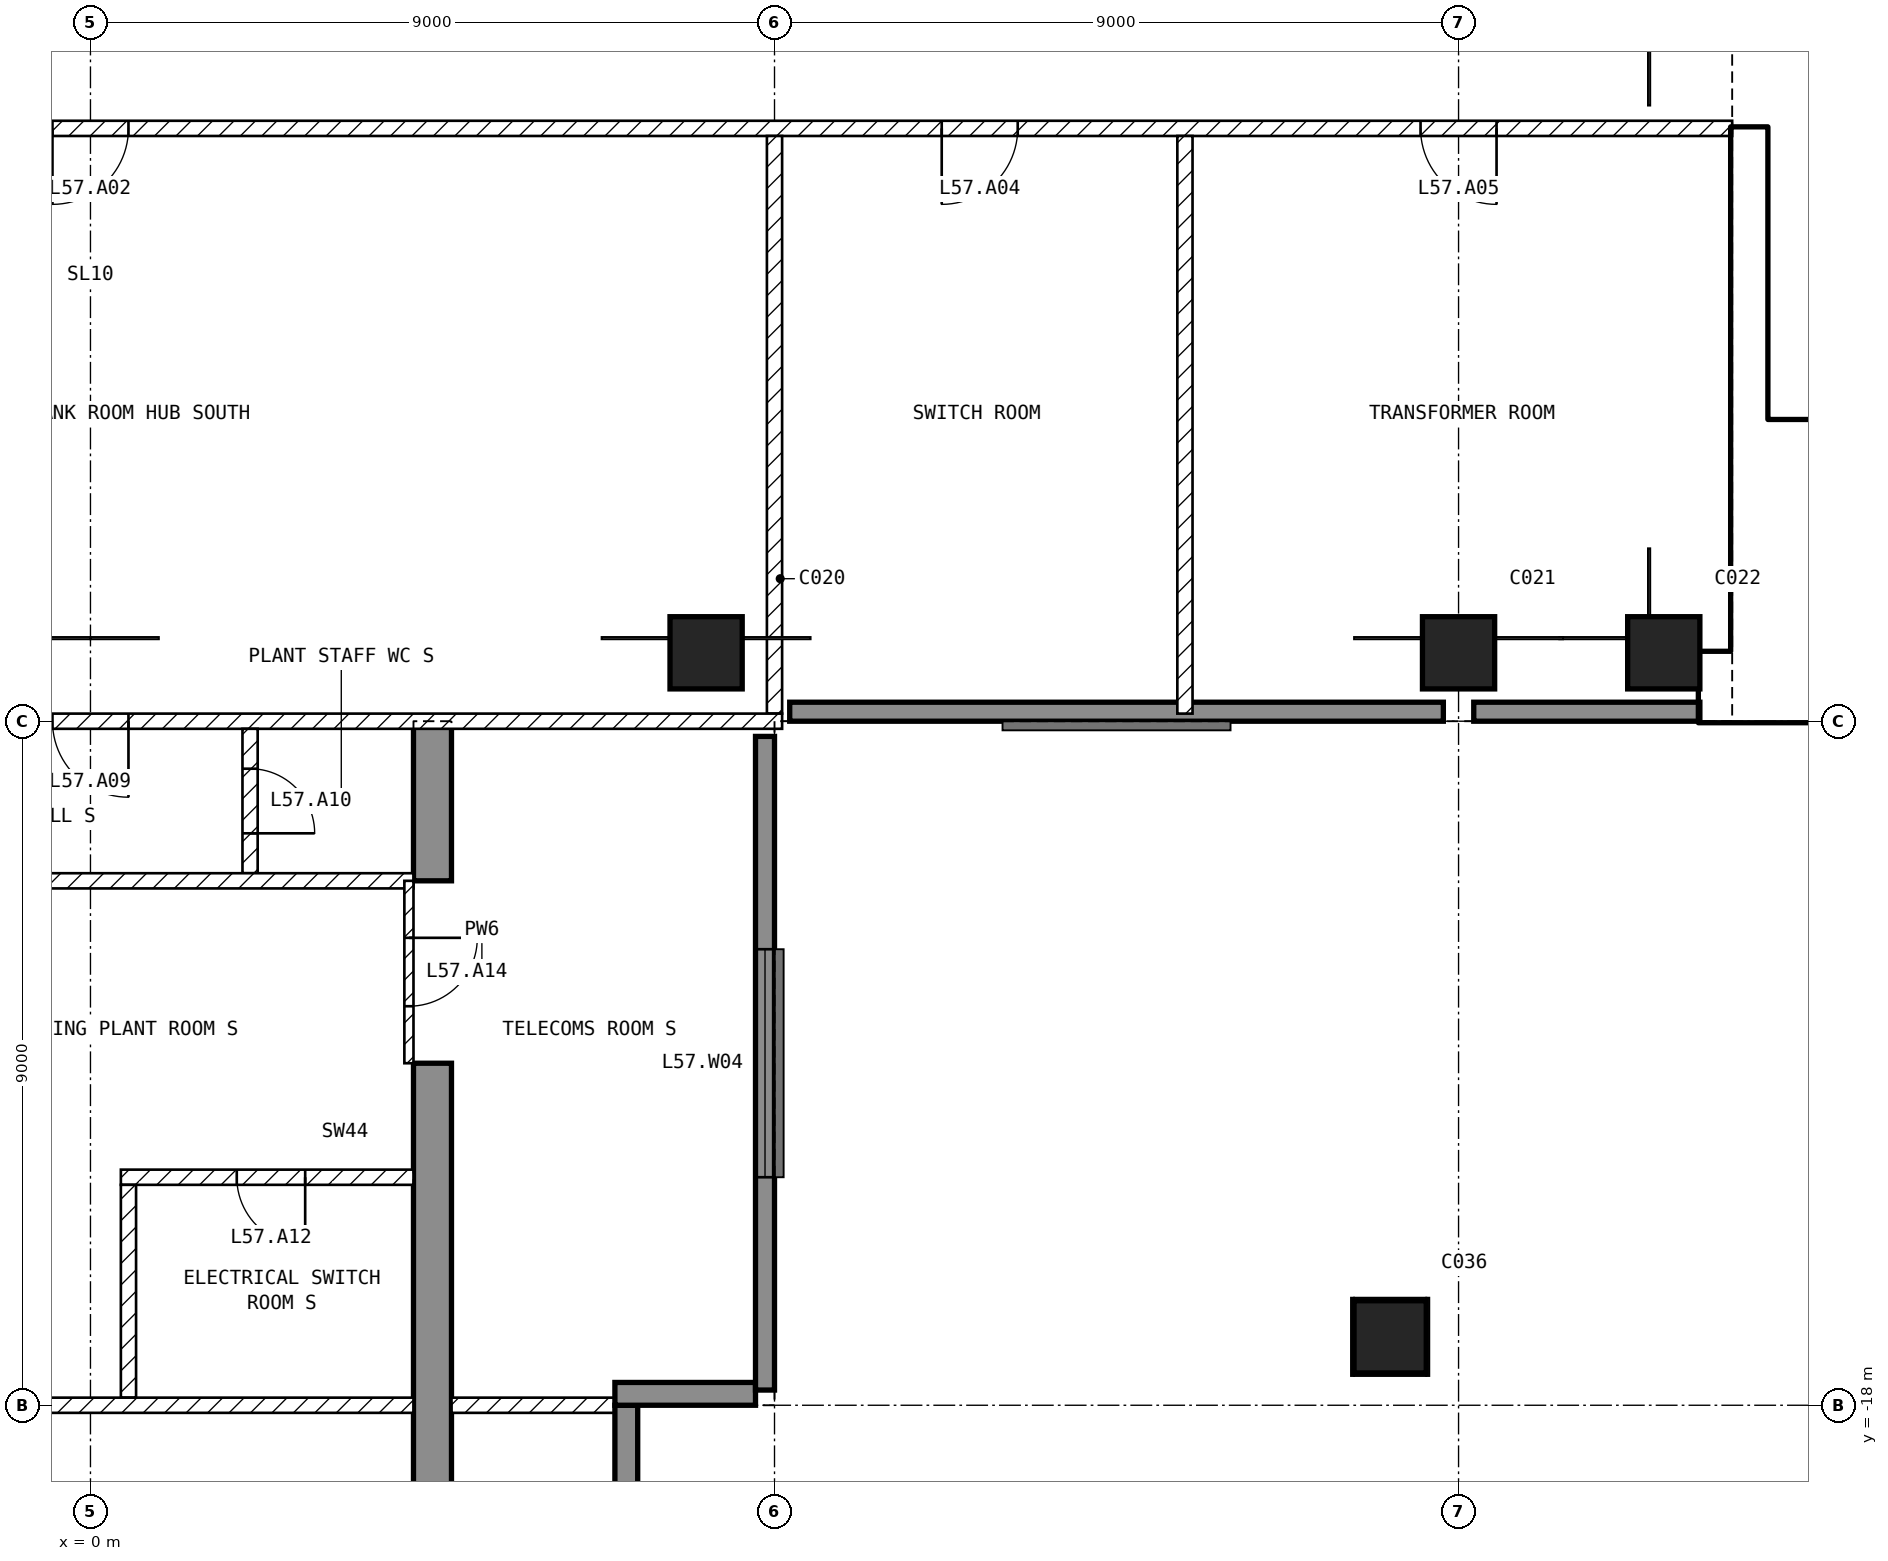
"""IFC4 building model, lengths in metres.
Left out: names, types, materials, properties, quantities, classifications, styles, units other than length and angle.
Written with IfcOpenShell. Run it as: python <this file> out.ifc"""

import sys

from ifc_helpers import new_model, si_unit, direction, frame, frame_2d, origin, origin_2d, place, context, subcontext, project, spatial, polyline, rectangle, outline, extrude, element, fill, save


model = new_model("IFC4")
c1 = context("Model", 3, precision=1e-05, world=origin(), true_north=direction((0.0, 1.0)))
c2 = subcontext(c1, "Body", "Model", "MODEL_VIEW")
j1 = project(units=[si_unit("LENGTHUNIT", "METRE"), si_unit("PLANEANGLEUNIT", "RADIAN")], contexts=[c1])
p1 = place(None, origin())
s1 = spatial("IfcSite", under=j1, at=p1, CompositionType="ELEMENT")
p2 = place(p1, origin())
s2 = spatial("IfcBuilding", under=s1, at=p2, CompositionType="ELEMENT")
p3 = place(p2, frame((0.0, 0.0, 228.0)))
s3 = spatial("IfcBuildingStorey", under=s2, at=p3, CompositionType="ELEMENT", Elevation=228.0)
for number, where, z_axis, x_axis in (
    (1, (8.1, -8.1, -0.45), (0.0, 0.0, 1.0), (1.0, 0.0, 0.0)),
    (2, (18.0, -8.1, -0.45), (0.0, 0.0, 1.0), (1.0, 0.0, 0.0)),
    (3, (20.7, -8.1, -0.45), (0.0, 0.0, 1.0), (1.0, 0.0, 0.0)),
    (4, (17.1, -17.1, -0.45), (0.0, 0.0, 1.0), (1.0, 0.0, 0.0)),
):
    element("IfcColumn", number, at=place(p3, frame(where, z_axis=z_axis, x_axis=x_axis)), inside=s3, PredefinedType="COLUMN", context=c2, shape_type="SweptSolid", body=[
        extrude(rectangle(XDim=0.95, YDim=0.95, at=origin_2d()), origin(), (0.0, 0.0, 1.0), 4.7),
    ])
p4 = place(p3, frame((4.25, -19.8, -0.45), z_axis=(1.0, 0.0, 0.0), x_axis=(0.0, 1.0, 0.0)))
e5 = element("IfcWall", 5, at=p4, inside=s3, PredefinedType="SHEAR", context=c2, shape_type="SweptSolid", body=[
    extrude(outline(polyline([(0.0, 0.0), (6.3, 0.0), (6.3, 2.85), (8.7, 2.85), (8.7, 0.0), (10.8, 0.0), (10.8, 4.7), (0.0, 4.7), (0.0, 0.0)])), origin(), (0.0, 0.0, 1.0), 0.5),
])
p5 = place(p3, frame((8.875, -17.8, 0.0), z_axis=(0.0, 0.0, 1.0), x_axis=(0.0, 1.0, 0.0)))
e6 = element("IfcWall", 6, at=p5, inside=s3, PredefinedType="SOLIDWALL", context=c2, shape_type="SweptSolid", body=[
    extrude(rectangle(XDim=8.6, YDim=0.25, at=frame_2d((4.3, 0.0))), origin(), (0.0, 0.0, 1.0), 4.25),
])
p6 = place(p5, frame((2.8, 0.0, 1.0)))
e7 = element("IfcOpeningElement", 7, at=p6, cuts=e6, PredefinedType="OPENING", context=c2, shape_type="SweptSolid", body=[
    extrude(rectangle(XDim=3.0, YDim=2.4, at=frame_2d((1.5, 1.2))), frame((0.0, 0.135, 0.0), z_axis=(0.0, -1.0, 0.0), x_axis=(1.0, 0.0, 0.0)), (0.0, 0.0, 1.0), 0.27),
])
p7 = place(p3, frame((9.2, -8.875, 0.0), z_axis=(0.0, 0.0, 1.0), x_axis=(1.0, 0.0, 0.0)))
e8 = element("IfcWall", 8, at=p7, inside=s3, PredefinedType="SOLIDWALL", context=c2, shape_type="SweptSolid", body=[
    extrude(rectangle(XDim=8.6, YDim=0.25, at=frame_2d((4.3, 0.0))), origin(), (0.0, 0.0, 1.0), 4.25),
])
p8 = place(p3, frame((18.2, -8.875, 0.0), z_axis=(0.0, 0.0, 1.0), x_axis=(1.0, 0.0, 0.0)))
e9 = element("IfcWall", 9, at=p8, inside=s3, PredefinedType="SOLIDWALL", context=c2, shape_type="SweptSolid", body=[
    extrude(rectangle(XDim=2.975, YDim=0.25, at=frame_2d((1.488, 0.0))), origin(), (0.0, 0.0, 1.0), 4.25),
])
p9 = place(p3, frame((7.05, -19.8, 0.0), z_axis=(0.0, 0.0, 1.0), x_axis=(0.0, 1.0, 0.0)))
e10 = element("IfcWall", 10, at=p9, inside=s3, PredefinedType="SOLIDWALL", context=c2, shape_type="SweptSolid", body=[
    extrude(rectangle(XDim=1.8, YDim=0.3, at=frame_2d((0.9, 0.0))), origin(), (0.0, 0.0, 1.0), 4.25),
])
p10 = place(p3, frame((6.9, -17.85, 0.0), z_axis=(0.0, 0.0, 1.0), x_axis=(1.0, 0.0, 0.0)))
e11 = element("IfcWall", 11, at=p10, inside=s3, PredefinedType="SOLIDWALL", context=c2, shape_type="SweptSolid", body=[
    extrude(rectangle(XDim=1.85, YDim=0.3, at=frame_2d((0.925, 0.0))), origin(), (0.0, 0.0, 1.0), 4.25),
])
p11 = place(p3, frame((21.175, -8.55, 0.0), z_axis=(0.0, 0.0, 1.0), x_axis=(1.0, 0.0, 0.0)))
e12 = element("IfcWall", 12, at=p11, inside=s3, PredefinedType="SHEAR", context=c2, shape_type="SweptSolid", body=[
    extrude(rectangle(XDim=9.025, YDim=0.9, at=frame_2d((4.512, 0.0))), origin(), (0.0, 0.0, 1.0), 4.25),
])
p12 = place(p3, frame((21.825, -8.1, 0.0), z_axis=(0.0, 0.0, 1.0), x_axis=(0.0, 1.0, 0.0)))
e13 = element("IfcWall", 13, at=p12, inside=s3, PredefinedType="SHEAR", context=c2, shape_type="SweptSolid", body=[
    extrude(rectangle(XDim=6.9, YDim=0.45, at=frame_2d((3.45, 0.0))), origin(), (0.0, 0.0, 1.0), 4.25),
])
p13 = place(p3, frame((22.05, -5.15, 0.0), z_axis=(0.0, 0.0, 1.0), x_axis=(1.0, 0.0, 0.0)))
e14 = element("IfcWall", 14, at=p13, inside=s3, PredefinedType="SOLIDWALL", context=c2, shape_type="SweptSolid", body=[
    extrude(rectangle(XDim=6.3, YDim=0.2, at=frame_2d((3.15, 0.0))), origin(), (0.0, 0.0, 1.0), 4.25),
])
p14 = place(p13, frame((0.2, 0.0, 0.0)))
e15 = element("IfcOpeningElement", 15, at=p14, cuts=e14, PredefinedType="OPENING", context=c2, shape_type="SweptSolid", body=[
    extrude(rectangle(XDim=1.0, YDim=2.1, at=frame_2d((0.5, 1.05))), frame((0.0, 0.11, 0.0), z_axis=(0.0, -1.0, 0.0), x_axis=(1.0, 0.0, 0.0)), (0.0, 0.0, 1.0), 0.22),
])
p15 = place(p3, frame((21.6, -1.2, 0.0), z_axis=(0.0, 0.0, 1.0), x_axis=(-1.0, 0.0, 0.0)))
e16 = element("IfcWall", 16, at=p15, inside=s3, PredefinedType="PARTITIONING", context=c2, shape_type="SweptSolid", body=[
    extrude(rectangle(XDim=43.2, YDim=0.2, at=frame_2d((21.6, 0.0))), origin(), (0.0, 0.0, 1.0), 4.25),
])
p16 = place(p15, frame((21.1, 0.0, 0.0)))
e17 = element("IfcOpeningElement", 17, at=p16, cuts=e16, PredefinedType="OPENING", context=c2, shape_type="SweptSolid", body=[
    extrude(rectangle(XDim=1.0, YDim=2.1, at=frame_2d((0.5, 1.05))), frame((0.0, 0.11, 0.0), z_axis=(0.0, -1.0, 0.0), x_axis=(1.0, 0.0, 0.0)), (0.0, 0.0, 1.0), 0.22),
])
p17 = place(p15, frame((9.4, 0.0, 0.0)))
e18 = element("IfcOpeningElement", 18, at=p17, cuts=e16, PredefinedType="OPENING", context=c2, shape_type="SweptSolid", body=[
    extrude(rectangle(XDim=1.0, YDim=2.1, at=frame_2d((0.5, 1.05))), frame((0.0, 0.11, 0.0), z_axis=(0.0, -1.0, 0.0), x_axis=(1.0, 0.0, 0.0)), (0.0, 0.0, 1.0), 0.22),
])
p18 = place(p15, frame((3.1, 0.0, 0.0)))
e19 = element("IfcOpeningElement", 19, at=p18, cuts=e16, PredefinedType="OPENING", context=c2, shape_type="SweptSolid", body=[
    extrude(rectangle(XDim=1.0, YDim=2.1, at=frame_2d((0.5, 1.05))), frame((0.0, 0.11, 0.0), z_axis=(0.0, -1.0, 0.0), x_axis=(1.0, 0.0, 0.0)), (0.0, 0.0, 1.0), 0.22),
])
p19 = place(p15, frame((32.8, 0.0, 0.0)))
e20 = element("IfcOpeningElement", 20, at=p19, cuts=e16, PredefinedType="OPENING", context=c2, shape_type="SweptSolid", body=[
    extrude(rectangle(XDim=1.0, YDim=2.1, at=frame_2d((0.5, 1.05))), frame((0.0, 0.11, 0.0), z_axis=(0.0, -1.0, 0.0), x_axis=(1.0, 0.0, 0.0)), (0.0, 0.0, 1.0), 0.22),
])
p20 = place(p15, frame((39.1, 0.0, 0.0)))
e21 = element("IfcOpeningElement", 21, at=p20, cuts=e16, PredefinedType="OPENING", context=c2, shape_type="SweptSolid", body=[
    extrude(rectangle(XDim=1.0, YDim=2.1, at=frame_2d((0.5, 1.05))), frame((0.0, 0.11, 0.0), z_axis=(0.0, -1.0, 0.0), x_axis=(1.0, 0.0, 0.0)), (0.0, 0.0, 1.0), 0.22),
])
p21 = place(p3, frame((9.0, -1.3, 0.0), z_axis=(0.0, 0.0, 1.0), x_axis=(0.0, -1.0, 0.0)))
e22 = element("IfcWall", 22, at=p21, inside=s3, PredefinedType="PARTITIONING", context=c2, shape_type="SweptSolid", body=[
    extrude(rectangle(XDim=7.6, YDim=0.2, at=frame_2d((3.8, 0.0))), origin(), (0.0, 0.0, 1.0), 4.25),
])
p22 = place(p3, frame((9.1, -9.0, 0.0), z_axis=(0.0, 0.0, 1.0), x_axis=(-1.0, 0.0, 0.0)))
e23 = element("IfcWall", 23, at=p22, inside=s3, PredefinedType="PARTITIONING", context=c2, shape_type="SweptSolid", body=[
    extrude(rectangle(XDim=18.2, YDim=0.2, at=frame_2d((9.1, 0.0))), origin(), (0.0, 0.0, 1.0), 4.25),
])
p23 = place(p22, frame((8.6, 0.0, 0.0)))
e24 = element("IfcOpeningElement", 24, at=p23, cuts=e23, PredefinedType="OPENING", context=c2, shape_type="SweptSolid", body=[
    extrude(rectangle(XDim=1.0, YDim=2.1, at=frame_2d((0.5, 1.05))), frame((0.0, 0.11, 0.0), z_axis=(0.0, -1.0, 0.0), x_axis=(1.0, 0.0, 0.0)), (0.0, 0.0, 1.0), 0.22),
])
p24 = place(p3, frame((14.4, -1.3, 0.0), z_axis=(0.0, 0.0, 1.0), x_axis=(0.0, -1.0, 0.0)))
e25 = element("IfcWall", 25, at=p24, inside=s3, PredefinedType="PARTITIONING", context=c2, shape_type="SweptSolid", body=[
    extrude(rectangle(XDim=7.6, YDim=0.2, at=frame_2d((3.8, 0.0))), origin(), (0.0, 0.0, 1.0), 4.25),
])
p25 = place(p3, frame((2.1, -9.1, 0.0), z_axis=(0.0, 0.0, 1.0), x_axis=(0.0, -1.0, 0.0)))
e26 = element("IfcWall", 26, at=p25, inside=s3, PredefinedType="PARTITIONING", context=c2, shape_type="SweptSolid", body=[
    extrude(rectangle(XDim=1.9, YDim=0.2, at=frame_2d((0.95, 0.0))), origin(), (0.0, 0.0, 1.0), 4.25),
])
p26 = place(p25, frame((0.525, 0.0, 0.0)))
e27 = element("IfcOpeningElement", 27, at=p26, cuts=e26, PredefinedType="OPENING", context=c2, shape_type="SweptSolid", body=[
    extrude(rectangle(XDim=0.85, YDim=2.1, at=frame_2d((0.425, 1.05))), frame((0.0, 0.11, 0.0), z_axis=(0.0, -1.0, 0.0), x_axis=(1.0, 0.0, 0.0)), (0.0, 0.0, 1.0), 0.22),
])
p27 = place(p3, frame((4.25, -11.1, 0.0), z_axis=(0.0, 0.0, 1.0), x_axis=(-1.0, 0.0, 0.0)))
e28 = element("IfcWall", 28, at=p27, inside=s3, PredefinedType="PARTITIONING", context=c2, shape_type="SweptSolid", body=[
    extrude(rectangle(XDim=8.5, YDim=0.2, at=frame_2d((4.25, 0.0))), origin(), (0.0, 0.0, 1.0), 4.25),
])
p28 = place(p27, frame((4.825, 0.0, 0.0)))
e29 = element("IfcOpeningElement", 29, at=p28, cuts=e28, PredefinedType="OPENING", context=c2, shape_type="SweptSolid", body=[
    extrude(rectangle(XDim=1.0, YDim=2.1, at=frame_2d((0.5, 1.05))), frame((0.0, 0.11, 0.0), z_axis=(0.0, -1.0, 0.0), x_axis=(1.0, 0.0, 0.0)), (0.0, 0.0, 1.0), 0.22),
])
p29 = place(p3, frame((4.25, -15.0, 0.0), z_axis=(0.0, 0.0, 1.0), x_axis=(-1.0, 0.0, 0.0)))
e30 = element("IfcWall", 30, at=p29, inside=s3, PredefinedType="PARTITIONING", context=c2, shape_type="SweptSolid", body=[
    extrude(rectangle(XDim=3.85, YDim=0.2, at=frame_2d((1.925, 0.0))), origin(), (0.0, 0.0, 1.0), 4.25),
])
p30 = place(p29, frame((1.425, 0.0, 0.0)))
e31 = element("IfcOpeningElement", 31, at=p30, cuts=e30, PredefinedType="OPENING", context=c2, shape_type="SweptSolid", body=[
    extrude(rectangle(XDim=0.9, YDim=2.1, at=frame_2d((0.45, 1.05))), frame((0.0, 0.11, 0.0), z_axis=(0.0, -1.0, 0.0), x_axis=(1.0, 0.0, 0.0)), (0.0, 0.0, 1.0), 0.22),
])
p31 = place(p3, frame((0.5, -15.1, 0.0), z_axis=(0.0, 0.0, 1.0), x_axis=(0.0, -1.0, 0.0)))
e32 = element("IfcWall", 32, at=p31, inside=s3, PredefinedType="PARTITIONING", context=c2, shape_type="SweptSolid", body=[
    extrude(rectangle(XDim=2.8, YDim=0.2, at=frame_2d((1.4, 0.0))), origin(), (0.0, 0.0, 1.0), 4.25),
])
p32 = place(p3, frame((4.25, -18.0, 0.0), z_axis=(0.0, 0.0, 1.0), x_axis=(-1.0, 0.0, 0.0)))
e33 = element("IfcWall", 33, at=p32, inside=s3, PredefinedType="PARTITIONING", context=c2, shape_type="SweptSolid", body=[
    extrude(rectangle(XDim=8.5, YDim=0.2, at=frame_2d((4.25, 0.0))), origin(), (0.0, 0.0, 1.0), 4.25),
])
p33 = place(p32, frame((5.675, 0.0, 0.0)))
e34 = element("IfcOpeningElement", 34, at=p33, cuts=e33, PredefinedType="OPENING", context=c2, shape_type="SweptSolid", body=[
    extrude(rectangle(XDim=0.9, YDim=2.1, at=frame_2d((0.45, 1.05))), frame((0.0, 0.11, 0.0), z_axis=(0.0, -1.0, 0.0), x_axis=(1.0, 0.0, 0.0)), (0.0, 0.0, 1.0), 0.22),
])
p34 = place(p3, frame((6.9, -18.0, 0.0), z_axis=(0.0, 0.0, 1.0), x_axis=(-1.0, 0.0, 0.0)))
e35 = element("IfcWall", 35, at=p34, inside=s3, PredefinedType="PARTITIONING", context=c2, shape_type="SweptSolid", body=[
    extrude(rectangle(XDim=2.15, YDim=0.2, at=frame_2d((1.075, 0.0))), origin(), (0.0, 0.0, 1.0), 4.25),
])
p35 = place(p3, frame((4.19, -11.1, 0.0), z_axis=(0.0, 0.0, 1.0), x_axis=(0.0, -1.0, 0.0)))
e36 = element("IfcWall", 36, at=p35, inside=s3, PredefinedType="PARTITIONING", context=c2, shape_type="SweptSolid", body=[
    extrude(rectangle(XDim=2.4, YDim=0.12, at=frame_2d((1.2, 0.0))), origin(), (0.0, 0.0, 1.0), 2.4),
])
p36 = place(p35, frame((0.75, 0.0, 0.0)))
e37 = element("IfcOpeningElement", 37, at=p36, cuts=e36, PredefinedType="OPENING", context=c2, shape_type="SweptSolid", body=[
    extrude(rectangle(XDim=0.9, YDim=2.1, at=frame_2d((0.45, 1.05))), frame((0.0, 0.07, 0.0), z_axis=(0.0, -1.0, 0.0), x_axis=(1.0, 0.0, 0.0)), (0.0, 0.0, 1.0), 0.14),
])
p37 = place(p6, origin())
e38 = element("IfcWindow", 38, at=p37, inside=s3, PartitioningType="SINGLE_PANEL", PredefinedType="WINDOW", context=c2, shape_type="SweptSolid", body=[
    extrude(rectangle(XDim=3.0, YDim=2.4, at=frame_2d((1.5, 1.2))), frame((0.0, 0.03, 0.0), z_axis=(0.0, -1.0, 0.0), x_axis=(1.0, 0.0, 0.0)), (0.0, 0.0, 1.0), 0.06),
])
fill(e7, e38)
p38 = place(p14, origin())
e39 = element("IfcDoor", 39, at=p38, inside=s3, OperationType="SINGLE_SWING_LEFT", PredefinedType="DOOR", context=c2, shape_type="SweptSolid", body=[
    extrude(rectangle(XDim=1.0, YDim=2.1, at=frame_2d((0.5, 1.05))), frame((0.0, 0.025, 0.0), z_axis=(0.0, -1.0, 0.0), x_axis=(1.0, 0.0, 0.0)), (0.0, 0.0, 1.0), 0.05),
])
fill(e15, e39)
p39 = place(p16, origin())
e40 = element("IfcDoor", 40, at=p39, inside=s3, OperationType="SINGLE_SWING_RIGHT", PredefinedType="DOOR", context=c2, shape_type="SweptSolid", body=[
    extrude(rectangle(XDim=1.0, YDim=2.1, at=frame_2d((0.5, 1.05))), frame((0.0, 0.025, 0.0), z_axis=(0.0, -1.0, 0.0), x_axis=(1.0, 0.0, 0.0)), (0.0, 0.0, 1.0), 0.05),
])
fill(e17, e40)
p40 = place(p17, origin())
e41 = element("IfcDoor", 41, at=p40, inside=s3, OperationType="SINGLE_SWING_RIGHT", PredefinedType="DOOR", context=c2, shape_type="SweptSolid", body=[
    extrude(rectangle(XDim=1.0, YDim=2.1, at=frame_2d((0.5, 1.05))), frame((0.0, 0.025, 0.0), z_axis=(0.0, -1.0, 0.0), x_axis=(1.0, 0.0, 0.0)), (0.0, 0.0, 1.0), 0.05),
])
fill(e18, e41)
p41 = place(p18, origin())
e42 = element("IfcDoor", 42, at=p41, inside=s3, OperationType="SINGLE_SWING_LEFT", PredefinedType="DOOR", context=c2, shape_type="SweptSolid", body=[
    extrude(rectangle(XDim=1.0, YDim=2.1, at=frame_2d((0.5, 1.05))), frame((0.0, 0.025, 0.0), z_axis=(0.0, -1.0, 0.0), x_axis=(1.0, 0.0, 0.0)), (0.0, 0.0, 1.0), 0.05),
])
fill(e19, e42)
p42 = place(p23, origin())
e43 = element("IfcDoor", 43, at=p42, inside=s3, OperationType="SINGLE_SWING_LEFT", PredefinedType="DOOR", context=c2, shape_type="SweptSolid", body=[
    extrude(rectangle(XDim=1.0, YDim=2.1, at=frame_2d((0.5, 1.05))), frame((0.0, 0.025, 0.0), z_axis=(0.0, -1.0, 0.0), x_axis=(1.0, 0.0, 0.0)), (0.0, 0.0, 1.0), 0.05),
])
fill(e24, e43)
p43 = place(p26, origin())
e44 = element("IfcDoor", 44, at=p43, inside=s3, OperationType="SINGLE_SWING_RIGHT", PredefinedType="DOOR", context=c2, shape_type="SweptSolid", body=[
    extrude(rectangle(XDim=0.85, YDim=2.1, at=frame_2d((0.425, 1.05))), frame((0.0, 0.025, 0.0), z_axis=(0.0, -1.0, 0.0), x_axis=(1.0, 0.0, 0.0)), (0.0, 0.0, 1.0), 0.05),
])
fill(e27, e44)
p44 = place(p30, origin())
e45 = element("IfcDoor", 45, at=p44, inside=s3, OperationType="SINGLE_SWING_LEFT", PredefinedType="DOOR", context=c2, shape_type="SweptSolid", body=[
    extrude(rectangle(XDim=0.9, YDim=2.1, at=frame_2d((0.45, 1.05))), frame((0.0, 0.025, 0.0), z_axis=(0.0, -1.0, 0.0), x_axis=(1.0, 0.0, 0.0)), (0.0, 0.0, 1.0), 0.05),
])
fill(e31, e45)
p45 = place(p36, origin())
e46 = element("IfcDoor", 46, at=p45, inside=s3, OperationType="SINGLE_SWING_LEFT", PredefinedType="DOOR", context=c2, shape_type="SweptSolid", body=[
    extrude(rectangle(XDim=0.9, YDim=2.1, at=frame_2d((0.45, 1.05))), frame((0.0, 0.025, 0.0), z_axis=(0.0, -1.0, 0.0), x_axis=(1.0, 0.0, 0.0)), (0.0, 0.0, 1.0), 0.05),
])
fill(e37, e46)
save(model, sys.argv[1])
